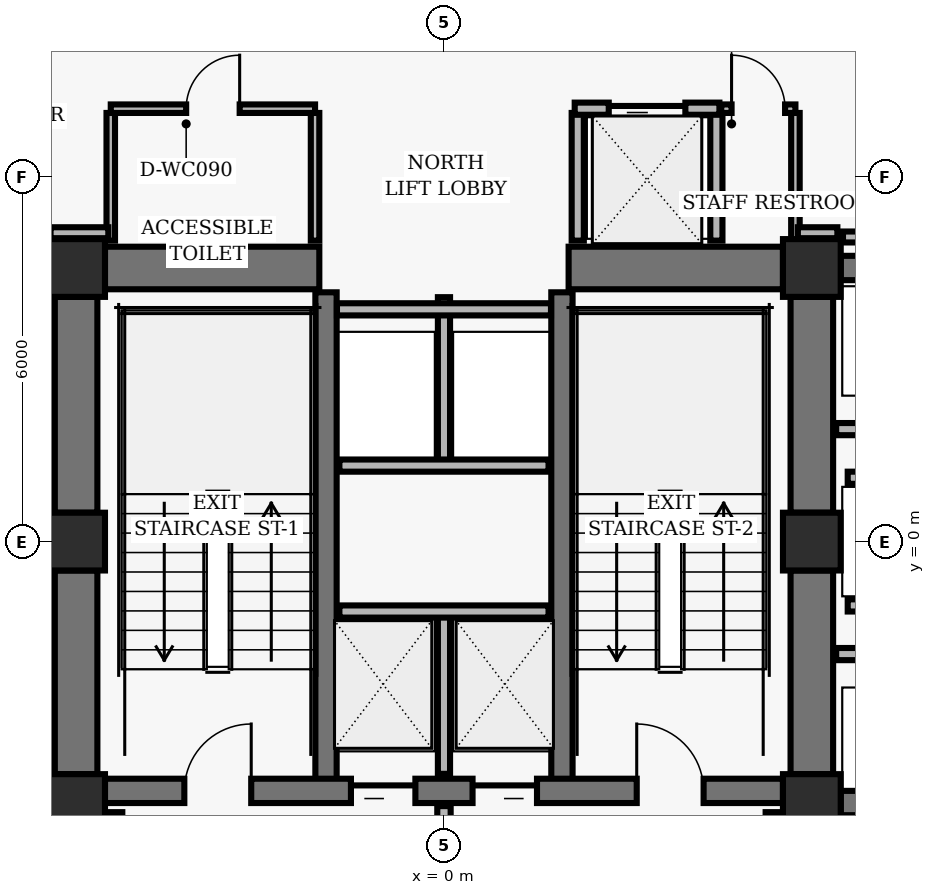
"""IFC4 building model, lengths in metres.
Left out: names, types, materials, properties, quantities, classifications, styles, units other than length and angle.
Written with IfcOpenShell. Run it as: python <this file> out.ifc"""

import sys

from ifc_helpers import new_model, si_unit, direction, frame, frame_2d, origin, origin_2d, place, context, subcontext, project, spatial, rectangle, hollow_rectangle, extrude, element, fill, save


model = new_model("IFC4")
c1 = context("Model", 3, precision=1e-05, world=origin(), true_north=direction((0.0, 1.0)))
c2 = subcontext(c1, "Body", "Model", "MODEL_VIEW")
j1 = project(units=[si_unit("LENGTHUNIT", "METRE"), si_unit("PLANEANGLEUNIT", "RADIAN")], contexts=[c1])
p1 = place(None, origin())
s1 = spatial("IfcSite", under=j1, at=p1, CompositionType="ELEMENT")
p2 = place(p1, origin())
s2 = spatial("IfcBuilding", under=s1, at=p2, CompositionType="ELEMENT")
p3 = place(p2, frame((0.0, 0.0, 22.24)))
s3 = spatial("IfcBuildingStorey", under=s2, at=p3, CompositionType="ELEMENT", Elevation=22.24)
for number, where, z_axis, x_axis in (
    (1, (-6.05, 4.5, 0.0), (0.0, 0.0, 1.0), (1.0, 0.0, 0.0)),
    (2, (6.05, 4.5, 0.0), (0.0, 0.0, 1.0), (1.0, 0.0, 0.0)),
    (3, (-6.05, 0.0, 0.0), (0.0, 0.0, 1.0), (1.0, 0.0, 0.0)),
    (4, (6.05, 0.0, 0.0), (0.0, 0.0, 1.0), (1.0, 0.0, 0.0)),
    (5, (-6.05, -4.3, 0.0), (0.0, 0.0, 1.0), (1.0, 0.0, 0.0)),
    (6, (6.05, -4.3, 0.0), (0.0, 0.0, 1.0), (1.0, 0.0, 0.0)),
):
    element("IfcColumn", number, at=place(p3, frame(where, z_axis=z_axis, x_axis=x_axis)), inside=s3, PredefinedType="COLUMN", context=c2, shape_type="SweptSolid", body=[
        extrude(hollow_rectangle(XDim=0.95, YDim=0.95, WallThickness=0.06, InnerFilletRadius=0.02, OuterFilletRadius=0.04, at=origin_2d()), origin(), (0.0, 0.0, 1.0), 3.36),
    ])
p4 = place(p3, frame((-6.05, 0.475, 0.0), z_axis=(0.0, 0.0, 1.0), x_axis=(0.0, 1.0, 0.0)))
e7 = element("IfcWall", 7, at=p4, inside=s3, PredefinedType="SHEAR", context=c2, shape_type="SweptSolid", body=[
    extrude(rectangle(XDim=3.55, YDim=0.7, at=frame_2d((1.775, 0.0))), origin(), (0.0, 0.0, 1.0), 3.098),
])
p5 = place(p3, frame((-6.05, -3.825, 0.0), z_axis=(0.0, 0.0, 1.0), x_axis=(0.0, 1.0, 0.0)))
e8 = element("IfcWall", 8, at=p5, inside=s3, PredefinedType="SHEAR", context=c2, shape_type="SweptSolid", body=[
    extrude(rectangle(XDim=3.35, YDim=0.7, at=frame_2d((1.675, 0.0))), origin(), (0.0, 0.0, 1.0), 3.098),
])
p6 = place(p3, frame((6.05, 0.475, 0.0), z_axis=(0.0, 0.0, 1.0), x_axis=(0.0, 1.0, 0.0)))
e9 = element("IfcWall", 9, at=p6, inside=s3, PredefinedType="SHEAR", context=c2, shape_type="SweptSolid", body=[
    extrude(rectangle(XDim=3.55, YDim=0.7, at=frame_2d((1.775, 0.0))), origin(), (0.0, 0.0, 1.0), 3.098),
])
p7 = place(p3, frame((6.05, -3.825, 0.0), z_axis=(0.0, 0.0, 1.0), x_axis=(0.0, 1.0, 0.0)))
e10 = element("IfcWall", 10, at=p7, inside=s3, PredefinedType="SHEAR", context=c2, shape_type="SweptSolid", body=[
    extrude(rectangle(XDim=3.35, YDim=0.7, at=frame_2d((1.675, 0.0))), origin(), (0.0, 0.0, 1.0), 3.098),
])
for number, where, z_axis, x_axis in (
    (11, (-1.94, -4.1, 0.0), (0.0, 0.0, 1.0), (0.0, 1.0, 0.0)),
    (12, (1.94, -4.1, 0.0), (0.0, 0.0, 1.0), (0.0, 1.0, 0.0)),
):
    element("IfcWall", number, at=place(p3, frame(where, z_axis=z_axis, x_axis=x_axis)), inside=s3, PredefinedType="SHEAR", context=c2, shape_type="SweptSolid", body=[
        extrude(rectangle(XDim=8.2, YDim=0.35, at=frame_2d((4.1, 0.0))), origin(), (0.0, 0.0, 1.0), 3.098),
    ])
p8 = place(p3, frame((-5.575, -4.1, 0.0), z_axis=(0.0, 0.0, 1.0), x_axis=(1.0, 0.0, 0.0)))
e13 = element("IfcWall", 13, at=p8, inside=s3, PredefinedType="SHEAR", context=c2, shape_type="SweptSolid", body=[
    extrude(rectangle(XDim=11.15, YDim=0.4, at=frame_2d((5.575, 0.0))), origin(), (0.0, 0.0, 1.0), 3.098),
])
p9 = place(p8, frame((1.305, 0.0, 0.0)))
e14 = element("IfcOpeningElement", 14, at=p9, cuts=e13, PredefinedType="OPENING", context=c2, shape_type="SweptSolid", body=[
    extrude(rectangle(XDim=1.1, YDim=2.04, at=frame_2d((0.55, 1.02))), frame((0.0, 0.21, 0.0), z_axis=(0.0, -1.0, 0.0), x_axis=(1.0, 0.0, 0.0)), (0.0, 0.0, 1.0), 0.42),
])
p10 = place(p8, frame((8.745, 0.0, 0.0)))
e15 = element("IfcOpeningElement", 15, at=p10, cuts=e13, PredefinedType="OPENING", context=c2, shape_type="SweptSolid", body=[
    extrude(rectangle(XDim=1.1, YDim=2.04, at=frame_2d((0.55, 1.02))), frame((0.0, 0.21, 0.0), z_axis=(0.0, -1.0, 0.0), x_axis=(1.0, 0.0, 0.0)), (0.0, 0.0, 1.0), 0.42),
])
p11 = place(p8, frame((4.045, 0.0, 0.0)))
e16 = element("IfcOpeningElement", 16, at=p11, cuts=e13, PredefinedType="OPENING", context=c2, shape_type="SweptSolid", body=[
    extrude(rectangle(XDim=1.06, YDim=2.04, at=frame_2d((0.53, 1.02))), frame((0.0, 0.21, 0.0), z_axis=(0.0, -1.0, 0.0), x_axis=(1.0, 0.0, 0.0)), (0.0, 0.0, 1.0), 0.42),
])
p12 = place(p8, frame((6.045, 0.0, 0.0)))
e17 = element("IfcOpeningElement", 17, at=p12, cuts=e13, PredefinedType="OPENING", context=c2, shape_type="SweptSolid", body=[
    extrude(rectangle(XDim=1.06, YDim=2.04, at=frame_2d((0.53, 1.02))), frame((0.0, 0.21, 0.0), z_axis=(0.0, -1.0, 0.0), x_axis=(1.0, 0.0, 0.0)), (0.0, 0.0, 1.0), 0.42),
])
for number, where, z_axis, x_axis in (
    (18, (-5.575, 4.5, 0.0), (0.0, 0.0, 1.0), (1.0, 0.0, 0.0)),
    (19, (2.05, 4.5, 0.0), (0.0, 0.0, 1.0), (1.0, 0.0, 0.0)),
):
    element("IfcWall", number, at=place(p3, frame(where, z_axis=z_axis, x_axis=x_axis)), inside=s3, PredefinedType="SHEAR", context=c2, shape_type="SweptSolid", body=[
        extrude(rectangle(XDim=3.525, YDim=0.7, at=frame_2d((1.762, 0.0))), origin(), (0.0, 0.0, 1.0), 3.098),
    ])
for number, where, z_axis, x_axis in (
    (20, (6.525, 4.5, 0.0), (0.0, 0.0, 1.0), (1.0, 0.0, 0.0)),
    (21, (6.525, -4.3, 0.0), (0.0, 0.0, 1.0), (1.0, 0.0, 0.0)),
):
    element("IfcWall", number, at=place(p3, frame(where, z_axis=z_axis, x_axis=x_axis)), inside=s3, PredefinedType="SHEAR", context=c2, shape_type="SweptSolid", body=[
        extrude(rectangle(XDim=1.95, YDim=0.4, at=frame_2d((0.975, 0.0))), origin(), (0.0, 0.0, 1.0), 3.098),
    ])
p13 = place(p3, frame((0.0, -3.82, 0.0), z_axis=(0.0, 0.0, 1.0), x_axis=(0.0, 1.0, 0.0)))
e22 = element("IfcWall", 22, at=p13, inside=s3, PredefinedType="PARTITIONING", context=c2, shape_type="SweptSolid", body=[
    extrude(rectangle(XDim=2.67, YDim=0.2, at=frame_2d((1.335, 0.0))), origin(), (0.0, 0.0, 1.0), 3.073),
])
p14 = place(p3, frame((-1.72, -1.15, 0.0), z_axis=(0.0, 0.0, 1.0), x_axis=(1.0, 0.0, 0.0)))
e23 = element("IfcWall", 23, at=p14, inside=s3, PredefinedType="PARTITIONING", context=c2, shape_type="SweptSolid", body=[
    extrude(rectangle(XDim=3.44, YDim=0.2, at=frame_2d((1.72, 0.0))), origin(), (0.0, 0.0, 1.0), 3.073),
])
for number, where, z_axis, x_axis in (
    (24, (-5.4, -7.16, 0.0), (0.0, 0.0, 1.0), (0.0, 1.0, 0.0)),
    (25, (5.4, -7.16, 0.0), (0.0, 0.0, 1.0), (0.0, 1.0, 0.0)),
):
    element("IfcWall", number, at=place(p3, frame(where, z_axis=z_axis, x_axis=x_axis)), inside=s3, PredefinedType="PARTITIONING", context=c2, shape_type="SweptSolid", body=[
        extrude(rectangle(XDim=2.71, YDim=0.22, at=frame_2d((1.355, 0.0))), origin(), (0.0, 0.0, 1.0), 3.073),
    ])
p15 = place(p3, frame((0.0, -7.16, 0.0), z_axis=(0.0, 0.0, 1.0), x_axis=(0.0, 1.0, 0.0)))
e26 = element("IfcWall", 26, at=p15, inside=s3, PredefinedType="PARTITIONING", context=c2, shape_type="SweptSolid", body=[
    extrude(rectangle(XDim=2.81, YDim=0.22, at=frame_2d((1.405, 0.0))), origin(), (0.0, 0.0, 1.0), 3.073),
])
p16 = place(p3, frame((0.0, 1.25, 0.0), z_axis=(0.0, 0.0, 1.0), x_axis=(0.0, 1.0, 0.0)))
e27 = element("IfcWall", 27, at=p16, inside=s3, PredefinedType="PARTITIONING", context=c2, shape_type="SweptSolid", body=[
    extrude(rectangle(XDim=2.77, YDim=0.2, at=frame_2d((1.385, 0.0))), origin(), (0.0, 0.0, 1.0), 3.073),
])
p17 = place(p3, frame((-1.72, 1.25, 0.0), z_axis=(0.0, 0.0, 1.0), x_axis=(1.0, 0.0, 0.0)))
e28 = element("IfcWall", 28, at=p17, inside=s3, PredefinedType="PARTITIONING", context=c2, shape_type="SweptSolid", body=[
    extrude(rectangle(XDim=3.44, YDim=0.2, at=frame_2d((1.72, 0.0))), origin(), (0.0, 0.0, 1.0), 3.073),
])
p18 = place(p3, frame((-1.76, 3.82, 0.0), z_axis=(0.0, 0.0, 1.0), x_axis=(1.0, 0.0, 0.0)))
e29 = element("IfcWall", 29, at=p18, inside=s3, PredefinedType="PARTITIONING", context=c2, shape_type="SweptSolid", body=[
    extrude(rectangle(XDim=3.52, YDim=0.2, at=frame_2d((1.76, 0.0))), origin(), (0.0, 0.0, 1.0), 3.073),
])
for number, where, z_axis, x_axis in (
    (30, (2.2, 4.95, 0.0), (0.0, 0.0, 1.0), (0.0, 1.0, 0.0)),
    (31, (4.48, 4.95, 0.0), (0.0, 0.0, 1.0), (0.0, 1.0, 0.0)),
):
    element("IfcWall", number, at=place(p3, frame(where, z_axis=z_axis, x_axis=x_axis)), inside=s3, PredefinedType="PARTITIONING", context=c2, shape_type="SweptSolid", body=[
        extrude(rectangle(XDim=2.1, YDim=0.2, at=frame_2d((1.05, 0.0))), origin(), (0.0, 0.0, 1.0), 3.073),
    ])
p19 = place(p3, frame((2.15, 7.12, 0.0), z_axis=(0.0, 0.0, 1.0), x_axis=(1.0, 0.0, 0.0)))
e32 = element("IfcWall", 32, at=p19, inside=s3, PredefinedType="PARTITIONING", context=c2, shape_type="SweptSolid", body=[
    extrude(rectangle(XDim=2.38, YDim=0.2, at=frame_2d((1.19, 0.0))), origin(), (0.0, 0.0, 1.0), 3.073),
])
p20 = place(p19, frame((0.56, 0.0, 0.0)))
e33 = element("IfcOpeningElement", 33, at=p20, cuts=e32, PredefinedType="OPENING", context=c2, shape_type="SweptSolid", body=[
    extrude(rectangle(XDim=1.26, YDim=2.06, at=frame_2d((0.63, 1.03))), frame((0.0, 0.11, 0.0), z_axis=(0.0, -1.0, 0.0), x_axis=(1.0, 0.0, 0.0)), (0.0, 0.0, 1.0), 0.22),
])
for number, where, z_axis, x_axis in (
    (34, (-5.48, 4.95, 0.0), (0.0, 0.0, 1.0), (0.0, 1.0, 0.0)),
    (35, (-2.12, 4.95, 0.0), (0.0, 0.0, 1.0), (0.0, 1.0, 0.0)),
):
    element("IfcWall", number, at=place(p3, frame(where, z_axis=z_axis, x_axis=x_axis)), inside=s3, PredefinedType="PARTITIONING", context=c2, shape_type="SweptSolid", body=[
        extrude(rectangle(XDim=2.1, YDim=0.14, at=frame_2d((1.05, 0.0))), origin(), (0.0, 0.0, 1.0), 3.073),
    ])
p21 = place(p3, frame((-5.48, 7.12, 0.0), z_axis=(0.0, 0.0, 1.0), x_axis=(1.0, 0.0, 0.0)))
e36 = element("IfcWall", 36, at=p21, inside=s3, PredefinedType="PARTITIONING", context=c2, shape_type="SweptSolid", body=[
    extrude(rectangle(XDim=3.36, YDim=0.14, at=frame_2d((1.68, 0.0))), origin(), (0.0, 0.0, 1.0), 3.073),
])
p22 = place(p21, frame((1.24, 0.0, 0.0)))
e37 = element("IfcOpeningElement", 37, at=p22, cuts=e36, PredefinedType="OPENING", context=c2, shape_type="SweptSolid", body=[
    extrude(rectangle(XDim=0.88, YDim=2.02, at=frame_2d((0.44, 1.01))), frame((0.0, 0.08, 0.0), z_axis=(0.0, -1.0, 0.0), x_axis=(1.0, 0.0, 0.0)), (0.0, 0.0, 1.0), 0.16),
])
p23 = place(p3, frame((5.78, 4.95, 0.0), z_axis=(0.0, 0.0, 1.0), x_axis=(0.0, 1.0, 0.0)))
e38 = element("IfcWall", 38, at=p23, inside=s3, PredefinedType="PARTITIONING", context=c2, shape_type="SweptSolid", body=[
    extrude(rectangle(XDim=2.1, YDim=0.14, at=frame_2d((1.05, 0.0))), origin(), (0.0, 0.0, 1.0), 3.073),
])
p24 = place(p3, frame((4.56, 7.12, 0.0), z_axis=(0.0, 0.0, 1.0), x_axis=(1.0, 0.0, 0.0)))
e39 = element("IfcWall", 39, at=p24, inside=s3, PredefinedType="PARTITIONING", context=c2, shape_type="SweptSolid", body=[
    extrude(rectangle(XDim=1.22, YDim=0.14, at=frame_2d((0.61, 0.0))), origin(), (0.0, 0.0, 1.0), 3.073),
])
p25 = place(p24, frame((0.17, 0.0, 0.0)))
e40 = element("IfcOpeningElement", 40, at=p25, cuts=e39, PredefinedType="OPENING", context=c2, shape_type="SweptSolid", body=[
    extrude(rectangle(XDim=0.88, YDim=2.02, at=frame_2d((0.44, 1.01))), frame((0.0, 0.08, 0.0), z_axis=(0.0, -1.0, 0.0), x_axis=(1.0, 0.0, 0.0)), (0.0, 0.0, 1.0), 0.16),
])
for number, where, z_axis, x_axis in (
    (41, (6.45, -1.85, 0.0), (0.0, 0.0, 1.0), (1.0, 0.0, 0.0)),
    (42, (6.45, 1.85, 0.0), (0.0, 0.0, 1.0), (1.0, 0.0, 0.0)),
):
    element("IfcWall", number, at=place(p3, frame(where, z_axis=z_axis, x_axis=x_axis)), inside=s3, PredefinedType="PARTITIONING", context=c2, shape_type="SweptSolid", body=[
        extrude(rectangle(XDim=2.1, YDim=0.2, at=frame_2d((1.05, 0.0))), origin(), (0.0, 0.0, 1.0), 3.073),
    ])
for number, where, z_axis, x_axis in (
    (43, (6.64, -1.05, 0.0), (0.0, 0.0, 1.0), (1.0, 0.0, 0.0)),
    (44, (6.64, 1.05, 0.0), (0.0, 0.0, 1.0), (1.0, 0.0, 0.0)),
):
    element("IfcWall", number, at=place(p3, frame(where, z_axis=z_axis, x_axis=x_axis)), inside=s3, PredefinedType="PARTITIONING", context=c2, shape_type="SweptSolid", body=[
        extrude(rectangle(XDim=1.91, YDim=0.2, at=frame_2d((0.955, 0.0))), origin(), (0.0, 0.0, 1.0), 3.073),
    ])
p26 = place(p3, frame((9.37, 5.01, 0.0), z_axis=(0.0, 0.0, 1.0), x_axis=(-1.0, 0.0, 0.0)))
e45 = element("IfcWall", 45, at=p26, inside=s3, PredefinedType="PARTITIONING", context=c2, shape_type="SweptSolid", body=[
    extrude(rectangle(XDim=2.808, YDim=0.18, at=frame_2d((1.404, 0.0))), origin(), (0.0, 0.0, 1.0), 3.073),
])
p27 = place(p3, frame((6.47, 5.08, 0.0), z_axis=(0.0, 0.0, 1.0), x_axis=(-1.0, 0.0, 0.0)))
e46 = element("IfcWall", 46, at=p27, inside=s3, PredefinedType="PARTITIONING", context=c2, shape_type="SweptSolid", body=[
    extrude(rectangle(XDim=0.65, YDim=0.18, at=frame_2d((0.325, 0.0))), origin(), (0.0, 0.0, 1.0), 3.073),
])
p28 = place(p3, frame((-5.52, 5.08, 0.0), z_axis=(0.0, 0.0, 1.0), x_axis=(-1.0, 0.0, 0.0)))
e47 = element("IfcWall", 47, at=p28, inside=s3, PredefinedType="PARTITIONING", context=c2, shape_type="SweptSolid", body=[
    extrude(rectangle(XDim=0.95, YDim=0.18, at=frame_2d((0.475, 0.0))), origin(), (0.0, 0.0, 1.0), 3.073),
])
p29 = place(p9, origin())
e48 = element("IfcDoor", 48, at=p29, inside=s3, OperationType="SINGLE_SWING_RIGHT", PredefinedType="DOOR", context=c2, shape_type="SweptSolid", body=[
    extrude(rectangle(XDim=1.1, YDim=2.04, at=frame_2d((0.55, 1.02))), frame((0.0, 0.025, 0.0), z_axis=(0.0, -1.0, 0.0), x_axis=(1.0, 0.0, 0.0)), (0.0, 0.0, 1.0), 0.05),
])
fill(e14, e48)
p30 = place(p10, origin())
e49 = element("IfcDoor", 49, at=p30, inside=s3, OperationType="SINGLE_SWING_LEFT", PredefinedType="DOOR", context=c2, shape_type="SweptSolid", body=[
    extrude(rectangle(XDim=1.1, YDim=2.04, at=frame_2d((0.55, 1.02))), frame((0.0, 0.025, 0.0), z_axis=(0.0, -1.0, 0.0), x_axis=(1.0, 0.0, 0.0)), (0.0, 0.0, 1.0), 0.05),
])
fill(e15, e49)
p31 = place(p11, origin())
e50 = element("IfcDoor", 50, at=p31, inside=s3, OperationType="SLIDING_TO_LEFT", PredefinedType="DOOR", context=c2, shape_type="SweptSolid", body=[
    extrude(rectangle(XDim=1.06, YDim=2.04, at=frame_2d((0.53, 1.02))), frame((0.0, 0.025, 0.0), z_axis=(0.0, -1.0, 0.0), x_axis=(1.0, 0.0, 0.0)), (0.0, 0.0, 1.0), 0.05),
])
fill(e16, e50)
p32 = place(p12, origin())
e51 = element("IfcDoor", 51, at=p32, inside=s3, OperationType="SLIDING_TO_RIGHT", PredefinedType="DOOR", context=c2, shape_type="SweptSolid", body=[
    extrude(rectangle(XDim=1.06, YDim=2.04, at=frame_2d((0.53, 1.02))), frame((0.0, 0.025, 0.0), z_axis=(0.0, -1.0, 0.0), x_axis=(1.0, 0.0, 0.0)), (0.0, 0.0, 1.0), 0.05),
])
fill(e17, e51)
p33 = place(p20, origin())
e52 = element("IfcDoor", 52, at=p33, inside=s3, OperationType="SLIDING_TO_LEFT", PredefinedType="DOOR", context=c2, shape_type="SweptSolid", body=[
    extrude(rectangle(XDim=1.26, YDim=2.06, at=frame_2d((0.63, 1.03))), frame((0.0, 0.025, 0.0), z_axis=(0.0, -1.0, 0.0), x_axis=(1.0, 0.0, 0.0)), (0.0, 0.0, 1.0), 0.05),
])
fill(e33, e52)
p34 = place(p22, origin())
e53 = element("IfcDoor", 53, at=p34, inside=s3, OperationType="SINGLE_SWING_RIGHT", PredefinedType="DOOR", context=c2, shape_type="SweptSolid", body=[
    extrude(rectangle(XDim=0.88, YDim=2.02, at=frame_2d((0.44, 1.01))), frame((0.0, 0.025, 0.0), z_axis=(0.0, -1.0, 0.0), x_axis=(1.0, 0.0, 0.0)), (0.0, 0.0, 1.0), 0.05),
])
fill(e37, e53)
p35 = place(p25, origin())
e54 = element("IfcDoor", 54, at=p35, inside=s3, OperationType="SINGLE_SWING_LEFT", PredefinedType="DOOR", context=c2, shape_type="SweptSolid", body=[
    extrude(rectangle(XDim=0.88, YDim=2.02, at=frame_2d((0.44, 1.01))), frame((0.0, 0.025, 0.0), z_axis=(0.0, -1.0, 0.0), x_axis=(1.0, 0.0, 0.0)), (0.0, 0.0, 1.0), 0.05),
])
fill(e40, e54)
save(model, sys.argv[1])
